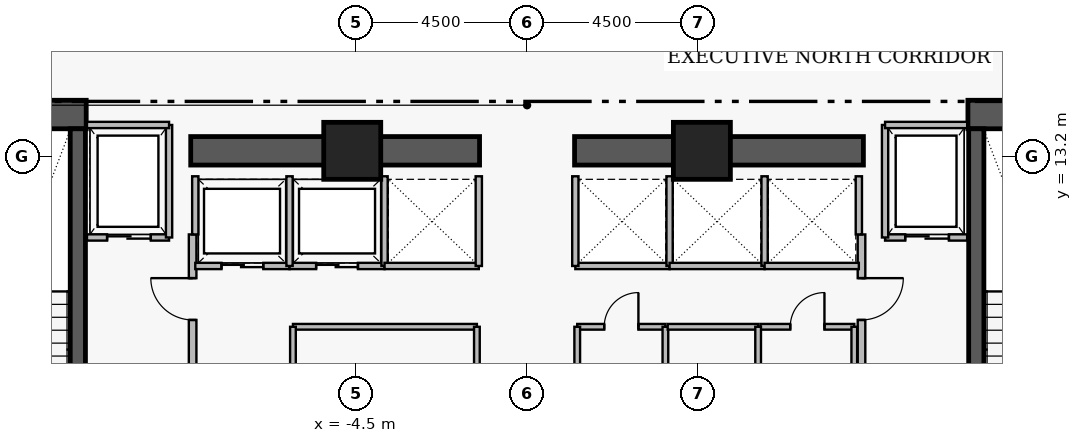
"""IFC4 building model, lengths in metres.
Left out: names, types, materials, properties, quantities, classifications, styles, units other than length and angle.
Written with IfcOpenShell. Run it as: python <this file> out.ifc"""

import sys

from ifc_helpers import new_model, si_unit, direction, frame, frame_2d, origin, origin_2d, place, context, subcontext, project, spatial, rectangle, extrude, element, fill, save


model = new_model("IFC4")
c1 = context("Model", 3, precision=1e-05, world=origin(), true_north=direction((0.0, 1.0)))
c2 = subcontext(c1, "Body", "Model", "MODEL_VIEW")
j1 = project(units=[si_unit("LENGTHUNIT", "METRE"), si_unit("PLANEANGLEUNIT", "RADIAN")], contexts=[c1])
p1 = place(None, origin())
s1 = spatial("IfcSite", under=j1, at=p1, CompositionType="ELEMENT")
p2 = place(p1, origin())
s2 = spatial("IfcBuilding", under=s1, at=p2, CompositionType="ELEMENT")
p3 = place(p2, frame((0.0, 0.0, 143.1)))
s3 = spatial("IfcBuildingStorey", under=s2, at=p3, CompositionType="ELEMENT", Elevation=143.1)
for number, where, z_axis, x_axis in (
    (1, (-16.16, 14.305, 0.0), (0.0, 0.0, 1.0), (1.0, 0.0, 0.0)),
    (2, (11.6, 14.305, 0.0), (0.0, 0.0, 1.0), (1.0, 0.0, 0.0)),
):
    element("IfcWall", number, at=place(p3, frame(where, z_axis=z_axis, x_axis=x_axis)), inside=s3, PredefinedType="SHEAR", context=c2, shape_type="SweptSolid", body=[
        extrude(rectangle(XDim=4.56, YDim=0.75, at=frame_2d((2.28, 0.0))), origin(), (0.0, 0.0, 1.0), 3.46),
    ])
for number, where, z_axis, x_axis in (
    (3, (-8.85, 13.35, 0.0), (0.0, 0.0, 1.0), (1.0, 0.0, 0.0)),
    (4, (1.25, 13.35, 0.0), (0.0, 0.0, 1.0), (1.0, 0.0, 0.0)),
):
    element("IfcWall", number, at=place(p3, frame(where, z_axis=z_axis, x_axis=x_axis)), inside=s3, PredefinedType="SHEAR", context=c2, shape_type="SweptSolid", body=[
        extrude(rectangle(XDim=7.6, YDim=0.75, at=frame_2d((3.8, 0.0))), origin(), (0.0, 0.0, 1.0), 3.43),
    ])
p4 = place(p3, frame((-11.82, 4.97, 0.0), z_axis=(0.0, 0.0, 1.0), x_axis=(0.0, 1.0, 0.0)))
e5 = element("IfcWall", 5, at=p4, inside=s3, PredefinedType="SHEAR", context=c2, shape_type="SweptSolid", body=[
    extrude(rectangle(XDim=8.96, YDim=0.4, at=frame_2d((4.48, 0.0))), origin(), (0.0, 0.0, 1.0), 3.46),
])
p5 = place(p4, frame((0.31, 0.0, 0.0)))
e6 = element("IfcOpeningElement", 6, at=p5, cuts=e5, PredefinedType="OPENING", context=c2, shape_type="SweptSolid", body=[
    extrude(rectangle(XDim=1.12, YDim=2.22, at=frame_2d((0.56, 1.11))), frame((0.0, 0.21, 0.0), z_axis=(0.0, -1.0, 0.0), x_axis=(1.0, 0.0, 0.0)), (0.0, 0.0, 1.0), 0.42),
])
p6 = place(p3, frame((11.82, 13.93, 0.0), z_axis=(0.0, 0.0, 1.0), x_axis=(0.0, -1.0, 0.0)))
e7 = element("IfcWall", 7, at=p6, inside=s3, PredefinedType="SHEAR", context=c2, shape_type="SweptSolid", body=[
    extrude(rectangle(XDim=8.96, YDim=0.4, at=frame_2d((4.48, 0.0))), origin(), (0.0, 0.0, 1.0), 3.46),
])
p7 = place(p6, frame((7.53, 0.0, 0.0)))
e8 = element("IfcOpeningElement", 8, at=p7, cuts=e7, PredefinedType="OPENING", context=c2, shape_type="SweptSolid", body=[
    extrude(rectangle(XDim=1.12, YDim=2.22, at=frame_2d((0.56, 1.11))), frame((0.0, 0.21, 0.0), z_axis=(0.0, -1.0, 0.0), x_axis=(1.0, 0.0, 0.0)), (0.0, 0.0, 1.0), 0.42),
])
for number, where, z_axis, x_axis in (
    (9, (-4.6, 13.35, 0.0), (0.0, 0.0, 1.0), (1.0, 0.0, 0.0)),
    (10, (4.6, 13.35, 0.0), (0.0, 0.0, 1.0), (1.0, 0.0, 0.0)),
):
    element("IfcColumn", number, at=place(p3, frame(where, z_axis=z_axis, x_axis=x_axis)), inside=s3, PredefinedType="COLUMN", context=c2, shape_type="SweptSolid", body=[
        extrude(rectangle(XDim=1.5, YDim=1.5, at=origin_2d()), origin(), (0.0, 0.0, 1.0), 3.65),
    ])
p8 = place(p3, frame((-8.8, 5.05, 0.0), z_axis=(0.0, 0.0, 1.0), x_axis=(0.0, 1.0, 0.0)))
e11 = element("IfcWall", 11, at=p8, inside=s3, PredefinedType="PARTITIONING", context=c2, shape_type="SweptSolid", body=[
    extrude(rectangle(XDim=6.1, YDim=0.2, at=frame_2d((3.05, 0.0))), origin(), (0.0, 0.0, 1.0), 3.43),
])
p9 = place(p8, frame((0.25, 0.0, 0.0)))
e12 = element("IfcOpeningElement", 12, at=p9, cuts=e11, PredefinedType="OPENING", context=c2, shape_type="SweptSolid", body=[
    extrude(rectangle(XDim=1.1, YDim=2.2, at=frame_2d((0.55, 1.1))), frame((0.0, 0.11, 0.0), z_axis=(0.0, -1.0, 0.0), x_axis=(1.0, 0.0, 0.0)), (0.0, 0.0, 1.0), 0.22),
])
p10 = place(p8, frame((3.85, 0.0, 0.0)))
e13 = element("IfcOpeningElement", 13, at=p10, cuts=e11, PredefinedType="OPENING", context=c2, shape_type="SweptSolid", body=[
    extrude(rectangle(XDim=1.1, YDim=2.2, at=frame_2d((0.55, 1.1))), frame((0.0, 0.11, 0.0), z_axis=(0.0, -1.0, 0.0), x_axis=(1.0, 0.0, 0.0)), (0.0, 0.0, 1.0), 0.22),
])
p11 = place(p3, frame((8.8, 11.15, 0.0), z_axis=(0.0, 0.0, 1.0), x_axis=(0.0, -1.0, 0.0)))
e14 = element("IfcWall", 14, at=p11, inside=s3, PredefinedType="PARTITIONING", context=c2, shape_type="SweptSolid", body=[
    extrude(rectangle(XDim=6.1, YDim=0.2, at=frame_2d((3.05, 0.0))), origin(), (0.0, 0.0, 1.0), 3.43),
])
p12 = place(p11, frame((1.15, 0.0, 0.0)))
e15 = element("IfcOpeningElement", 15, at=p12, cuts=e14, PredefinedType="OPENING", context=c2, shape_type="SweptSolid", body=[
    extrude(rectangle(XDim=1.1, YDim=2.2, at=frame_2d((0.55, 1.1))), frame((0.0, 0.11, 0.0), z_axis=(0.0, -1.0, 0.0), x_axis=(1.0, 0.0, 0.0)), (0.0, 0.0, 1.0), 0.22),
])
p13 = place(p11, frame((4.75, 0.0, 0.0)))
e16 = element("IfcOpeningElement", 16, at=p13, cuts=e14, PredefinedType="OPENING", context=c2, shape_type="SweptSolid", body=[
    extrude(rectangle(XDim=1.1, YDim=2.2, at=frame_2d((0.55, 1.1))), frame((0.0, 0.11, 0.0), z_axis=(0.0, -1.0, 0.0), x_axis=(1.0, 0.0, 0.0)), (0.0, 0.0, 1.0), 0.22),
])
p14 = place(p3, frame((-11.58, 11.07, 0.0), z_axis=(0.0, 0.0, 1.0), x_axis=(1.0, 0.0, 0.0)))
e17 = element("IfcWall", 17, at=p14, inside=s3, PredefinedType="PARTITIONING", context=c2, shape_type="SweptSolid", body=[
    extrude(rectangle(XDim=2.16, YDim=0.165, at=frame_2d((1.08, 0.0))), origin(), (0.0, 0.0, 1.0), 3.43),
])
p15 = place(p14, frame((0.53, 0.0, 0.0)))
e18 = element("IfcOpeningElement", 18, at=p15, cuts=e17, PredefinedType="OPENING", context=c2, shape_type="SweptSolid", body=[
    extrude(rectangle(XDim=1.15, YDim=2.25, at=frame_2d((0.575, 1.125))), frame((0.0, 0.093, 0.0), z_axis=(0.0, -1.0, 0.0), x_axis=(1.0, 0.0, 0.0)), (0.0, 0.0, 1.0), 0.185),
])
p16 = place(p3, frame((9.42, 11.07, 0.0), z_axis=(0.0, 0.0, 1.0), x_axis=(1.0, 0.0, 0.0)))
e19 = element("IfcWall", 19, at=p16, inside=s3, PredefinedType="PARTITIONING", context=c2, shape_type="SweptSolid", body=[
    extrude(rectangle(XDim=2.16, YDim=0.165, at=frame_2d((1.08, 0.0))), origin(), (0.0, 0.0, 1.0), 3.43),
])
p17 = place(p16, frame((0.53, 0.0, 0.0)))
e20 = element("IfcOpeningElement", 20, at=p17, cuts=e19, PredefinedType="OPENING", context=c2, shape_type="SweptSolid", body=[
    extrude(rectangle(XDim=1.15, YDim=2.25, at=frame_2d((0.575, 1.125))), frame((0.0, 0.093, 0.0), z_axis=(0.0, -1.0, 0.0), x_axis=(1.0, 0.0, 0.0)), (0.0, 0.0, 1.0), 0.185),
])
p18 = place(p3, frame((-8.73, 10.32, 0.0), z_axis=(0.0, 0.0, 1.0), x_axis=(1.0, 0.0, 0.0)))
e21 = element("IfcWall", 21, at=p18, inside=s3, PredefinedType="PARTITIONING", context=c2, shape_type="SweptSolid", body=[
    extrude(rectangle(XDim=2.48, YDim=0.165, at=frame_2d((1.24, 0.0))), origin(), (0.0, 0.0, 1.0), 3.43),
])
p19 = place(p18, frame((0.69, 0.0, 0.0)))
e22 = element("IfcOpeningElement", 22, at=p19, cuts=e21, PredefinedType="OPENING", context=c2, shape_type="SweptSolid", body=[
    extrude(rectangle(XDim=1.1, YDim=2.25, at=frame_2d((0.55, 1.125))), frame((0.0, 0.093, 0.0), z_axis=(0.0, -1.0, 0.0), x_axis=(1.0, 0.0, 0.0)), (0.0, 0.0, 1.0), 0.185),
])
p20 = place(p3, frame((-6.25, 10.32, 0.0), z_axis=(0.0, 0.0, 1.0), x_axis=(1.0, 0.0, 0.0)))
e23 = element("IfcWall", 23, at=p20, inside=s3, PredefinedType="PARTITIONING", context=c2, shape_type="SweptSolid", body=[
    extrude(rectangle(XDim=2.5, YDim=0.165, at=frame_2d((1.25, 0.0))), origin(), (0.0, 0.0, 1.0), 3.43),
])
p21 = place(p20, frame((0.7, 0.0, 0.0)))
e24 = element("IfcOpeningElement", 24, at=p21, cuts=e23, PredefinedType="OPENING", context=c2, shape_type="SweptSolid", body=[
    extrude(rectangle(XDim=1.1, YDim=2.25, at=frame_2d((0.55, 1.125))), frame((0.0, 0.093, 0.0), z_axis=(0.0, -1.0, 0.0), x_axis=(1.0, 0.0, 0.0)), (0.0, 0.0, 1.0), 0.185),
])
p22 = place(p3, frame((1.32, 8.72, 0.0), z_axis=(0.0, 0.0, 1.0), x_axis=(1.0, 0.0, 0.0)))
e25 = element("IfcWall", 25, at=p22, inside=s3, PredefinedType="PARTITIONING", context=c2, shape_type="SweptSolid", body=[
    extrude(rectangle(XDim=2.32, YDim=0.15, at=frame_2d((1.16, 0.0))), origin(), (0.0, 0.0, 1.0), 3.43),
])
p23 = place(p22, frame((0.71, 0.0, 0.0)))
e26 = element("IfcOpeningElement", 26, at=p23, cuts=e25, PredefinedType="OPENING", context=c2, shape_type="SweptSolid", body=[
    extrude(rectangle(XDim=0.9, YDim=2.15, at=frame_2d((0.45, 1.075))), frame((0.0, 0.085, 0.0), z_axis=(0.0, -1.0, 0.0), x_axis=(1.0, 0.0, 0.0)), (0.0, 0.0, 1.0), 0.17),
])
p24 = place(p3, frame((6.14, 8.72, 0.0), z_axis=(0.0, 0.0, 1.0), x_axis=(1.0, 0.0, 0.0)))
e27 = element("IfcWall", 27, at=p24, inside=s3, PredefinedType="PARTITIONING", context=c2, shape_type="SweptSolid", body=[
    extrude(rectangle(XDim=2.47, YDim=0.15, at=frame_2d((1.235, 0.0))), origin(), (0.0, 0.0, 1.0), 3.43),
])
p25 = place(p24, frame((0.785, 0.0, 0.0)))
e28 = element("IfcOpeningElement", 28, at=p25, cuts=e27, PredefinedType="OPENING", context=c2, shape_type="SweptSolid", body=[
    extrude(rectangle(XDim=0.9, YDim=2.15, at=frame_2d((0.45, 1.075))), frame((0.0, 0.085, 0.0), z_axis=(0.0, -1.0, 0.0), x_axis=(1.0, 0.0, 0.0)), (0.0, 0.0, 1.0), 0.17),
])
p26 = place(p3, frame((-9.42, 11.07, 0.0), z_axis=(0.0, 0.0, 1.0), x_axis=(0.0, 1.0, 0.0)))
e29 = element("IfcWall", 29, at=p26, inside=s3, PredefinedType="PARTITIONING", context=c2, shape_type="SweptSolid", body=[
    extrude(rectangle(XDim=2.96, YDim=0.165, at=frame_2d((1.48, 0.0))), origin(), (0.0, 0.0, 1.0), 3.43),
])
p27 = place(p3, frame((-11.58, 14.03, 0.0), z_axis=(0.0, 0.0, 1.0), x_axis=(1.0, 0.0, 0.0)))
e30 = element("IfcWall", 30, at=p27, inside=s3, PredefinedType="PARTITIONING", context=c2, shape_type="SweptSolid", body=[
    extrude(rectangle(XDim=2.16, YDim=0.165, at=frame_2d((1.08, 0.0))), origin(), (0.0, 0.0, 1.0), 3.43),
])
p28 = place(p3, frame((9.42, 11.07, 0.0), z_axis=(0.0, 0.0, 1.0), x_axis=(0.0, 1.0, 0.0)))
e31 = element("IfcWall", 31, at=p28, inside=s3, PredefinedType="PARTITIONING", context=c2, shape_type="SweptSolid", body=[
    extrude(rectangle(XDim=2.96, YDim=0.165, at=frame_2d((1.48, 0.0))), origin(), (0.0, 0.0, 1.0), 3.43),
])
p29 = place(p3, frame((9.42, 14.03, 0.0), z_axis=(0.0, 0.0, 1.0), x_axis=(1.0, 0.0, 0.0)))
e32 = element("IfcWall", 32, at=p29, inside=s3, PredefinedType="PARTITIONING", context=c2, shape_type="SweptSolid", body=[
    extrude(rectangle(XDim=2.16, YDim=0.165, at=frame_2d((1.08, 0.0))), origin(), (0.0, 0.0, 1.0), 3.43),
])
p30 = place(p3, frame((-8.73, 11.15, 0.0), z_axis=(0.0, 0.0, 1.0), x_axis=(0.0, 1.0, 0.0)))
e33 = element("IfcWall", 33, at=p30, inside=s3, PredefinedType="PARTITIONING", context=c2, shape_type="SweptSolid", body=[
    extrude(rectangle(XDim=1.53, YDim=0.165, at=frame_2d((0.765, 0.0))), origin(), (0.0, 0.0, 1.0), 3.43),
])
for number, where, z_axis, x_axis in (
    (34, (-6.25, 10.32, 0.0), (0.0, 0.0, 1.0), (0.0, 1.0, 0.0)),
    (35, (-3.75, 10.32, 0.0), (0.0, 0.0, 1.0), (0.0, 1.0, 0.0)),
):
    element("IfcWall", number, at=place(p3, frame(where, z_axis=z_axis, x_axis=x_axis)), inside=s3, PredefinedType="PARTITIONING", context=c2, shape_type="SweptSolid", body=[
        extrude(rectangle(XDim=2.36, YDim=0.165, at=frame_2d((1.18, 0.0))), origin(), (0.0, 0.0, 1.0), 3.43),
    ])
p31 = place(p3, frame((-3.75, 10.32, 0.0), z_axis=(0.0, 0.0, 1.0), x_axis=(1.0, 0.0, 0.0)))
e36 = element("IfcWall", 36, at=p31, inside=s3, PredefinedType="PARTITIONING", context=c2, shape_type="SweptSolid", body=[
    extrude(rectangle(XDim=2.48, YDim=0.165, at=frame_2d((1.24, 0.0))), origin(), (0.0, 0.0, 1.0), 3.43),
])
p32 = place(p3, frame((-1.27, 10.32, 0.0), z_axis=(0.0, 0.0, 1.0), x_axis=(0.0, 1.0, 0.0)))
e37 = element("IfcWall", 37, at=p32, inside=s3, PredefinedType="PARTITIONING", context=c2, shape_type="SweptSolid", body=[
    extrude(rectangle(XDim=2.36, YDim=0.165, at=frame_2d((1.18, 0.0))), origin(), (0.0, 0.0, 1.0), 3.43),
])
p33 = place(p3, frame((1.27, 10.32, 0.0), z_axis=(0.0, 0.0, 1.0), x_axis=(1.0, 0.0, 0.0)))
e38 = element("IfcWall", 38, at=p33, inside=s3, PredefinedType="PARTITIONING", context=c2, shape_type="SweptSolid", body=[
    extrude(rectangle(XDim=2.48, YDim=0.165, at=frame_2d((1.24, 0.0))), origin(), (0.0, 0.0, 1.0), 3.43),
])
for number, where, z_axis, x_axis in (
    (39, (1.27, 10.32, 0.0), (0.0, 0.0, 1.0), (0.0, 1.0, 0.0)),
    (40, (3.75, 10.32, 0.0), (0.0, 0.0, 1.0), (0.0, 1.0, 0.0)),
):
    element("IfcWall", number, at=place(p3, frame(where, z_axis=z_axis, x_axis=x_axis)), inside=s3, PredefinedType="PARTITIONING", context=c2, shape_type="SweptSolid", body=[
        extrude(rectangle(XDim=2.36, YDim=0.165, at=frame_2d((1.18, 0.0))), origin(), (0.0, 0.0, 1.0), 3.43),
    ])
p34 = place(p3, frame((3.75, 10.32, 0.0), z_axis=(0.0, 0.0, 1.0), x_axis=(1.0, 0.0, 0.0)))
e41 = element("IfcWall", 41, at=p34, inside=s3, PredefinedType="PARTITIONING", context=c2, shape_type="SweptSolid", body=[
    extrude(rectangle(XDim=2.5, YDim=0.165, at=frame_2d((1.25, 0.0))), origin(), (0.0, 0.0, 1.0), 3.43),
])
p35 = place(p3, frame((6.25, 10.32, 0.0), z_axis=(0.0, 0.0, 1.0), x_axis=(0.0, 1.0, 0.0)))
e42 = element("IfcWall", 42, at=p35, inside=s3, PredefinedType="PARTITIONING", context=c2, shape_type="SweptSolid", body=[
    extrude(rectangle(XDim=2.36, YDim=0.165, at=frame_2d((1.18, 0.0))), origin(), (0.0, 0.0, 1.0), 3.43),
])
p36 = place(p3, frame((6.25, 10.32, 0.0), z_axis=(0.0, 0.0, 1.0), x_axis=(1.0, 0.0, 0.0)))
e43 = element("IfcWall", 43, at=p36, inside=s3, PredefinedType="PARTITIONING", context=c2, shape_type="SweptSolid", body=[
    extrude(rectangle(XDim=2.48, YDim=0.165, at=frame_2d((1.24, 0.0))), origin(), (0.0, 0.0, 1.0), 3.43),
])
p37 = place(p3, frame((8.73, 11.15, 0.0), z_axis=(0.0, 0.0, 1.0), x_axis=(0.0, 1.0, 0.0)))
e44 = element("IfcWall", 44, at=p37, inside=s3, PredefinedType="PARTITIONING", context=c2, shape_type="SweptSolid", body=[
    extrude(rectangle(XDim=1.53, YDim=0.165, at=frame_2d((0.765, 0.0))), origin(), (0.0, 0.0, 1.0), 3.43),
])
p38 = place(p3, frame((-6.16, 8.72, 0.0), z_axis=(0.0, 0.0, 1.0), x_axis=(1.0, 0.0, 0.0)))
e45 = element("IfcWall", 45, at=p38, inside=s3, PredefinedType="PARTITIONING", context=c2, shape_type="SweptSolid", body=[
    extrude(rectangle(XDim=4.84, YDim=0.15, at=frame_2d((2.42, 0.0))), origin(), (0.0, 0.0, 1.0), 3.43),
])
for number, where, z_axis, x_axis in (
    (46, (-6.16, 6.48, 0.0), (0.0, 0.0, 1.0), (0.0, 1.0, 0.0)),
    (47, (-1.32, 6.48, 0.0), (0.0, 0.0, 1.0), (0.0, 1.0, 0.0)),
    (48, (1.32, 6.48, 0.0), (0.0, 0.0, 1.0), (0.0, 1.0, 0.0)),
    (49, (3.64, 6.48, 0.0), (0.0, 0.0, 1.0), (0.0, 1.0, 0.0)),
):
    element("IfcWall", number, at=place(p3, frame(where, z_axis=z_axis, x_axis=x_axis)), inside=s3, PredefinedType="PARTITIONING", context=c2, shape_type="SweptSolid", body=[
        extrude(rectangle(XDim=2.24, YDim=0.15, at=frame_2d((1.12, 0.0))), origin(), (0.0, 0.0, 1.0), 3.43),
    ])
p39 = place(p3, frame((3.7, 8.72, 0.0), z_axis=(0.0, 0.0, 1.0), x_axis=(1.0, 0.0, 0.0)))
e50 = element("IfcWall", 50, at=p39, inside=s3, PredefinedType="PARTITIONING", context=c2, shape_type="SweptSolid", body=[
    extrude(rectangle(XDim=2.38, YDim=0.15, at=frame_2d((1.19, 0.0))), origin(), (0.0, 0.0, 1.0), 3.43),
])
for number, where, z_axis, x_axis in (
    (51, (6.08, 6.48, 0.0), (0.0, 0.0, 1.0), (0.0, 1.0, 0.0)),
    (52, (8.61, 6.48, 0.0), (0.0, 0.0, 1.0), (0.0, 1.0, 0.0)),
):
    element("IfcWall", number, at=place(p3, frame(where, z_axis=z_axis, x_axis=x_axis)), inside=s3, PredefinedType="PARTITIONING", context=c2, shape_type="SweptSolid", body=[
        extrude(rectangle(XDim=2.24, YDim=0.15, at=frame_2d((1.12, 0.0))), origin(), (0.0, 0.0, 1.0), 3.43),
    ])
p40 = place(p10, origin())
e53 = element("IfcDoor", 53, at=p40, inside=s3, OperationType="SINGLE_SWING_RIGHT", PredefinedType="DOOR", context=c2, shape_type="SweptSolid", body=[
    extrude(rectangle(XDim=1.1, YDim=2.2, at=frame_2d((0.55, 1.1))), frame((0.0, 0.025, 0.0), z_axis=(0.0, -1.0, 0.0), x_axis=(1.0, 0.0, 0.0)), (0.0, 0.0, 1.0), 0.05),
])
fill(e13, e53)
p41 = place(p12, origin())
e54 = element("IfcDoor", 54, at=p41, inside=s3, OperationType="SINGLE_SWING_LEFT", PredefinedType="DOOR", context=c2, shape_type="SweptSolid", body=[
    extrude(rectangle(XDim=1.1, YDim=2.2, at=frame_2d((0.55, 1.1))), frame((0.0, 0.025, 0.0), z_axis=(0.0, -1.0, 0.0), x_axis=(1.0, 0.0, 0.0)), (0.0, 0.0, 1.0), 0.05),
])
fill(e15, e54)
p42 = place(p15, origin())
e55 = element("IfcDoor", 55, at=p42, inside=s3, OperationType="SLIDING_TO_LEFT", PredefinedType="DOOR", context=c2, shape_type="SweptSolid", body=[
    extrude(rectangle(XDim=1.15, YDim=2.25, at=frame_2d((0.575, 1.125))), frame((0.0, 0.025, 0.0), z_axis=(0.0, -1.0, 0.0), x_axis=(1.0, 0.0, 0.0)), (0.0, 0.0, 1.0), 0.05),
])
fill(e18, e55)
p43 = place(p17, origin())
e56 = element("IfcDoor", 56, at=p43, inside=s3, OperationType="SLIDING_TO_LEFT", PredefinedType="DOOR", context=c2, shape_type="SweptSolid", body=[
    extrude(rectangle(XDim=1.15, YDim=2.25, at=frame_2d((0.575, 1.125))), frame((0.0, 0.025, 0.0), z_axis=(0.0, -1.0, 0.0), x_axis=(1.0, 0.0, 0.0)), (0.0, 0.0, 1.0), 0.05),
])
fill(e20, e56)
p44 = place(p19, origin())
e57 = element("IfcDoor", 57, at=p44, inside=s3, OperationType="SLIDING_TO_LEFT", PredefinedType="DOOR", context=c2, shape_type="SweptSolid", body=[
    extrude(rectangle(XDim=1.1, YDim=2.25, at=frame_2d((0.55, 1.125))), frame((0.0, 0.025, 0.0), z_axis=(0.0, -1.0, 0.0), x_axis=(1.0, 0.0, 0.0)), (0.0, 0.0, 1.0), 0.05),
])
fill(e22, e57)
p45 = place(p21, origin())
e58 = element("IfcDoor", 58, at=p45, inside=s3, OperationType="SLIDING_TO_LEFT", PredefinedType="DOOR", context=c2, shape_type="SweptSolid", body=[
    extrude(rectangle(XDim=1.1, YDim=2.25, at=frame_2d((0.55, 1.125))), frame((0.0, 0.025, 0.0), z_axis=(0.0, -1.0, 0.0), x_axis=(1.0, 0.0, 0.0)), (0.0, 0.0, 1.0), 0.05),
])
fill(e24, e58)
p46 = place(p23, origin())
e59 = element("IfcDoor", 59, at=p46, inside=s3, OperationType="SINGLE_SWING_RIGHT", PredefinedType="DOOR", context=c2, shape_type="SweptSolid", body=[
    extrude(rectangle(XDim=0.9, YDim=2.15, at=frame_2d((0.45, 1.075))), frame((0.0, 0.025, 0.0), z_axis=(0.0, -1.0, 0.0), x_axis=(1.0, 0.0, 0.0)), (0.0, 0.0, 1.0), 0.05),
])
fill(e26, e59)
p47 = place(p25, origin())
e60 = element("IfcDoor", 60, at=p47, inside=s3, OperationType="SINGLE_SWING_RIGHT", PredefinedType="DOOR", context=c2, shape_type="SweptSolid", body=[
    extrude(rectangle(XDim=0.9, YDim=2.15, at=frame_2d((0.45, 1.075))), frame((0.0, 0.025, 0.0), z_axis=(0.0, -1.0, 0.0), x_axis=(1.0, 0.0, 0.0)), (0.0, 0.0, 1.0), 0.05),
])
fill(e28, e60)
save(model, sys.argv[1])
